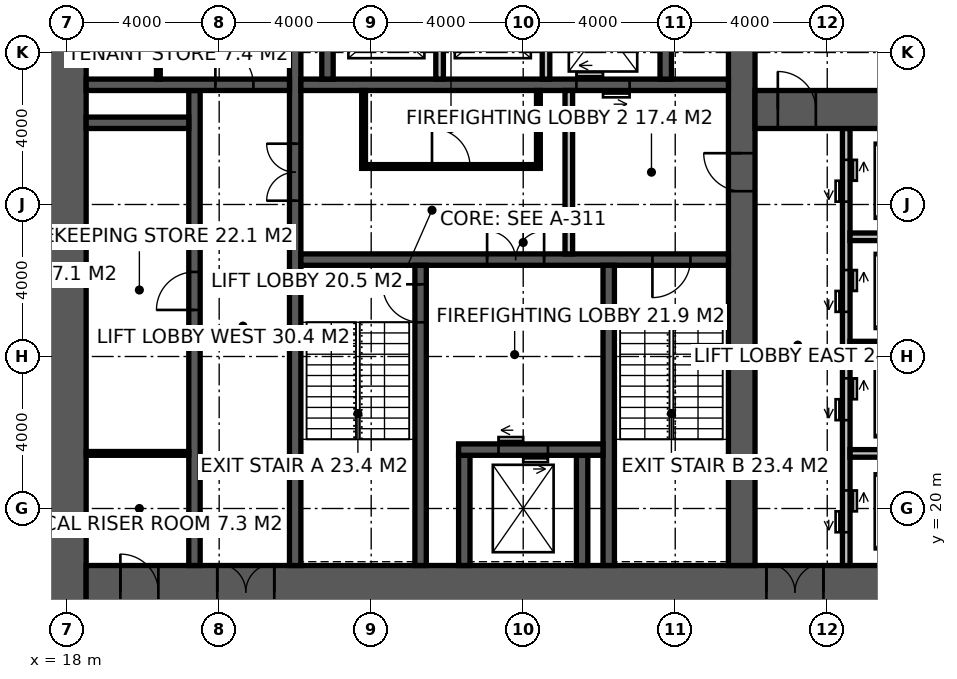
"""IFC4 building model, lengths in metres.
Left out: names, types, materials, properties, quantities, classifications, styles, units other than length and angle.
Written with IfcOpenShell. Run it as: python <this file> out.ifc"""

import sys

from ifc_helpers import new_model, si_unit, direction, frame, frame_2d, origin, place, context, subcontext, project, spatial, rectangle, extrude, element, fill, save


model = new_model("IFC4")
c1 = context("Model", 3, precision=1e-05, world=origin(), true_north=direction((0.0, 1.0)))
c2 = subcontext(c1, "Body", "Model", "MODEL_VIEW")
j1 = project(units=[si_unit("LENGTHUNIT", "METRE"), si_unit("PLANEANGLEUNIT", "RADIAN")], contexts=[c1])
p1 = place(None, origin())
s1 = spatial("IfcSite", under=j1, at=p1, CompositionType="ELEMENT")
p2 = place(p1, origin())
s2 = spatial("IfcBuilding", under=s1, at=p2, CompositionType="ELEMENT")
p3 = place(p2, frame((0.0, 0.0, 19.0)))
s3 = spatial("IfcBuildingStorey", under=s2, at=p3, CompositionType="ELEMENT", Elevation=19.0)
p4 = place(p3, frame((18.0, 17.1, -0.15), z_axis=(0.0, 0.0, 1.0), x_axis=(0.0, 1.0, 0.0)))
e1 = element("IfcWall", 1, at=p4, inside=s3, PredefinedType="SHEAR", context=c2, shape_type="SweptSolid", body=[
    extrude(rectangle(XDim=19.8, YDim=1.0, at=frame_2d((9.9, 0.0))), origin(), (0.0, 0.0, 1.0), 4.0),
])
p5 = place(p3, frame((18.5, 17.8, -0.15), z_axis=(0.0, 0.0, 1.0), x_axis=(1.0, 0.0, 0.0)))
e2 = element("IfcWall", 2, at=p5, inside=s3, PredefinedType="SHEAR", context=c2, shape_type="SweptSolid", body=[
    extrude(rectangle(XDim=23.0, YDim=1.4, at=frame_2d((11.5, 0.0))), origin(), (0.0, 0.0, 1.0), 4.0),
])
p6 = place(p5, frame((3.45, 0.0, 0.15)))
e3 = element("IfcOpeningElement", 3, at=p6, cuts=e2, PredefinedType="OPENING", context=c2, shape_type="SweptSolid", body=[
    extrude(rectangle(XDim=1.5, YDim=2.4, at=frame_2d((0.75, 1.2))), frame((0.0, 0.71, 0.0), z_axis=(0.0, -1.0, 0.0), x_axis=(1.0, 0.0, 0.0)), (0.0, 0.0, 1.0), 1.42),
])
p7 = place(p5, frame((17.9, 0.0, 0.15)))
e4 = element("IfcOpeningElement", 4, at=p7, cuts=e2, PredefinedType="OPENING", context=c2, shape_type="SweptSolid", body=[
    extrude(rectangle(XDim=1.5, YDim=2.4, at=frame_2d((0.75, 1.2))), frame((0.0, 0.71, 0.0), z_axis=(0.0, -1.0, 0.0), x_axis=(1.0, 0.0, 0.0)), (0.0, 0.0, 1.0), 1.42),
])
p8 = place(p5, frame((0.9, 0.0, 0.15)))
e5 = element("IfcOpeningElement", 5, at=p8, cuts=e2, PredefinedType="OPENING", context=c2, shape_type="SweptSolid", body=[
    extrude(rectangle(XDim=1.0, YDim=2.2, at=frame_2d((0.5, 1.1))), frame((0.0, 0.71, 0.0), z_axis=(0.0, -1.0, 0.0), x_axis=(1.0, 0.0, 0.0)), (0.0, 0.0, 1.0), 1.42),
])
p9 = place(p3, frame((35.75, 18.5, -0.15), z_axis=(0.0, 0.0, 1.0), x_axis=(0.0, 1.0, 0.0)))
e6 = element("IfcWall", 6, at=p9, inside=s3, PredefinedType="SHEAR", context=c2, shape_type="SweptSolid", body=[
    extrude(rectangle(XDim=17.0, YDim=0.7, at=frame_2d((8.5, 0.0))), origin(), (0.0, 0.0, 1.0), 4.0),
])
p10 = place(p9, frame((9.85, 0.0, 0.15)))
e7 = element("IfcOpeningElement", 7, at=p10, cuts=e6, PredefinedType="OPENING", context=c2, shape_type="SweptSolid", body=[
    extrude(rectangle(XDim=1.0, YDim=2.2, at=frame_2d((0.5, 1.1))), frame((0.0, 0.36, 0.0), z_axis=(0.0, -1.0, 0.0), x_axis=(1.0, 0.0, 0.0)), (0.0, 0.0, 1.0), 0.72),
])
p11 = place(p3, frame((24.0, 18.5, -0.15), z_axis=(0.0, 0.0, 1.0), x_axis=(0.0, 1.0, 0.0)))
e8 = element("IfcWall", 8, at=p11, inside=s3, PredefinedType="SHEAR", context=c2, shape_type="SweptSolid", body=[
    extrude(rectangle(XDim=17.0, YDim=0.3, at=frame_2d((8.5, 0.0))), origin(), (0.0, 0.0, 1.0), 4.0),
])
p12 = place(p11, frame((9.6, 0.0, 0.15)))
e9 = element("IfcOpeningElement", 9, at=p12, cuts=e8, PredefinedType="OPENING", context=c2, shape_type="SweptSolid", body=[
    extrude(rectangle(XDim=1.5, YDim=2.4, at=frame_2d((0.75, 1.2))), frame((0.0, 0.16, 0.0), z_axis=(0.0, -1.0, 0.0), x_axis=(1.0, 0.0, 0.0)), (0.0, 0.0, 1.0), 0.32),
])
p13 = place(p3, frame((24.15, 26.55, -0.15), z_axis=(0.0, 0.0, 1.0), x_axis=(1.0, 0.0, 0.0)))
e10 = element("IfcWall", 10, at=p13, inside=s3, PredefinedType="SHEAR", context=c2, shape_type="SweptSolid", body=[
    extrude(rectangle(XDim=11.25, YDim=0.3, at=frame_2d((5.625, 0.0))), origin(), (0.0, 0.0, 1.0), 4.0),
])
p14 = place(p13, frame((9.25, 0.0, 0.15)))
e11 = element("IfcOpeningElement", 11, at=p14, cuts=e10, PredefinedType="OPENING", context=c2, shape_type="SweptSolid", body=[
    extrude(rectangle(XDim=1.0, YDim=2.2, at=frame_2d((0.5, 1.1))), frame((0.0, 0.16, 0.0), z_axis=(0.0, -1.0, 0.0), x_axis=(1.0, 0.0, 0.0)), (0.0, 0.0, 1.0), 0.32),
])
p15 = place(p13, frame((4.9, 0.0, 0.15)))
e12 = element("IfcOpeningElement", 12, at=p15, cuts=e10, PredefinedType="OPENING", context=c2, shape_type="SweptSolid", body=[
    extrude(rectangle(XDim=1.5, YDim=2.4, at=frame_2d((0.75, 1.2))), frame((0.0, 0.16, 0.0), z_axis=(0.0, -1.0, 0.0), x_axis=(1.0, 0.0, 0.0)), (0.0, 0.0, 1.0), 0.32),
])
p16 = place(p3, frame((27.3, 18.5, -0.15), z_axis=(0.0, 0.0, 1.0), x_axis=(0.0, 1.0, 0.0)))
e13 = element("IfcWall", 13, at=p16, inside=s3, PredefinedType="SHEAR", context=c2, shape_type="SweptSolid", body=[
    extrude(rectangle(XDim=7.9, YDim=0.3, at=frame_2d((3.95, 0.0))), origin(), (0.0, 0.0, 1.0), 4.0),
])
p17 = place(p16, frame((6.4, 0.0, 0.15)))
e14 = element("IfcOpeningElement", 14, at=p17, cuts=e13, PredefinedType="OPENING", context=c2, shape_type="SweptSolid", body=[
    extrude(rectangle(XDim=1.0, YDim=2.2, at=frame_2d((0.5, 1.1))), frame((0.0, 0.16, 0.0), z_axis=(0.0, -1.0, 0.0), x_axis=(1.0, 0.0, 0.0)), (0.0, 0.0, 1.0), 0.32),
])
p18 = place(p3, frame((32.25, 18.5, -0.15), z_axis=(0.0, 0.0, 1.0), x_axis=(0.0, 1.0, 0.0)))
e15 = element("IfcWall", 15, at=p18, inside=s3, PredefinedType="SHEAR", context=c2, shape_type="SweptSolid", body=[
    extrude(rectangle(XDim=7.9, YDim=0.3, at=frame_2d((3.95, 0.0))), origin(), (0.0, 0.0, 1.0), 4.0),
])
for number, where, z_axis, x_axis in (
    (16, (28.45, 18.5, -0.15), (0.0, 0.0, 1.0), (0.0, 1.0, 0.0)),
    (17, (31.55, 18.5, -0.15), (0.0, 0.0, 1.0), (0.0, 1.0, 0.0)),
):
    element("IfcWall", number, at=place(p3, frame(where, z_axis=z_axis, x_axis=x_axis)), inside=s3, PredefinedType="SHEAR", context=c2, shape_type="SweptSolid", body=[
        extrude(rectangle(XDim=2.9, YDim=0.3, at=frame_2d((1.45, 0.0))), origin(), (0.0, 0.0, 1.0), 4.0),
    ])
p19 = place(p3, frame((28.3, 21.55, -0.15), z_axis=(0.0, 0.0, 1.0), x_axis=(1.0, 0.0, 0.0)))
e18 = element("IfcWall", 18, at=p19, inside=s3, PredefinedType="SHEAR", context=c2, shape_type="SweptSolid", body=[
    extrude(rectangle(XDim=3.8, YDim=0.3, at=frame_2d((1.9, 0.0))), origin(), (0.0, 0.0, 1.0), 4.0),
])
p20 = place(p19, frame((1.05, 0.0, 0.15)))
e19 = element("IfcOpeningElement", 19, at=p20, cuts=e18, PredefinedType="OPENING", context=c2, shape_type="SweptSolid", body=[
    extrude(rectangle(XDim=1.3, YDim=2.4, at=frame_2d((0.65, 1.2))), frame((0.0, 0.16, 0.0), z_axis=(0.0, -1.0, 0.0), x_axis=(1.0, 0.0, 0.0)), (0.0, 0.0, 1.0), 0.32),
])
p21 = place(p3, frame((24.15, 31.15, -0.15), z_axis=(0.0, 0.0, 1.0), x_axis=(1.0, 0.0, 0.0)))
e20 = element("IfcWall", 20, at=p21, inside=s3, PredefinedType="SHEAR", context=c2, shape_type="SweptSolid", body=[
    extrude(rectangle(XDim=11.25, YDim=0.3, at=frame_2d((5.625, 0.0))), origin(), (0.0, 0.0, 1.0), 4.0),
])
p22 = place(p21, frame((7.25, 0.0, 0.15)))
e21 = element("IfcOpeningElement", 21, at=p22, cuts=e20, PredefinedType="OPENING", context=c2, shape_type="SweptSolid", body=[
    extrude(rectangle(XDim=1.4, YDim=2.4, at=frame_2d((0.7, 1.2))), frame((0.0, 0.16, 0.0), z_axis=(0.0, -1.0, 0.0), x_axis=(1.0, 0.0, 0.0)), (0.0, 0.0, 1.0), 0.32),
])
p23 = place(p3, frame((21.35, 18.5, -0.15), z_axis=(0.0, 0.0, 1.0), x_axis=(0.0, 1.0, 0.0)))
e22 = element("IfcWall", 22, at=p23, inside=s3, PredefinedType="SHEAR", context=c2, shape_type="SweptSolid", body=[
    extrude(rectangle(XDim=12.5, YDim=0.3, at=frame_2d((6.25, 0.0))), origin(), (0.0, 0.0, 1.0), 4.0),
])
p24 = place(p23, frame((6.725, 0.0, 0.15)))
e23 = element("IfcOpeningElement", 23, at=p24, cuts=e22, PredefinedType="OPENING", context=c2, shape_type="SweptSolid", body=[
    extrude(rectangle(XDim=1.0, YDim=2.2, at=frame_2d((0.5, 1.1))), frame((0.0, 0.16, 0.0), z_axis=(0.0, -1.0, 0.0), x_axis=(1.0, 0.0, 0.0)), (0.0, 0.0, 1.0), 0.32),
])
p25 = place(p3, frame((18.5, 31.15, -0.15), z_axis=(0.0, 0.0, 1.0), x_axis=(1.0, 0.0, 0.0)))
e24 = element("IfcWall", 24, at=p25, inside=s3, PredefinedType="SHEAR", context=c2, shape_type="SweptSolid", body=[
    extrude(rectangle(XDim=5.35, YDim=0.3, at=frame_2d((2.675, 0.0))), origin(), (0.0, 0.0, 1.0), 4.0),
])
p26 = place(p25, frame((3.4, 0.0, 0.15)))
e25 = element("IfcOpeningElement", 25, at=p26, cuts=e24, PredefinedType="OPENING", context=c2, shape_type="SweptSolid", body=[
    extrude(rectangle(XDim=1.0, YDim=2.2, at=frame_2d((0.5, 1.1))), frame((0.0, 0.16, 0.0), z_axis=(0.0, -1.0, 0.0), x_axis=(1.0, 0.0, 0.0)), (0.0, 0.0, 1.0), 0.32),
])
p27 = place(p3, frame((18.5, 30.15, -0.15), z_axis=(0.0, 0.0, 1.0), x_axis=(1.0, 0.0, 0.0)))
e26 = element("IfcWall", 26, at=p27, inside=s3, PredefinedType="SHEAR", context=c2, shape_type="SweptSolid", body=[
    extrude(rectangle(XDim=2.7, YDim=0.3, at=frame_2d((1.35, 0.0))), origin(), (0.0, 0.0, 1.0), 4.0),
])
for number, where, z_axis, x_axis in (
    (27, (24.85, 31.3, -0.15), (0.0, 0.0, 1.0), (0.0, 1.0, 0.0)),
    (28, (33.75, 31.3, -0.15), (0.0, 0.0, 1.0), (0.0, 1.0, 0.0)),
):
    element("IfcWall", number, at=place(p3, frame(where, z_axis=z_axis, x_axis=x_axis)), inside=s3, PredefinedType="SHEAR", context=c2, shape_type="SweptSolid", body=[
        extrude(rectangle(XDim=4.2, YDim=0.3, at=frame_2d((2.1, 0.0))), origin(), (0.0, 0.0, 1.0), 4.0),
    ])
for number, where, z_axis, x_axis in (
    (29, (27.8, 31.3, -0.15), (0.0, 0.0, 1.0), (0.0, 1.0, 0.0)),
    (30, (30.6, 31.3, -0.15), (0.0, 0.0, 1.0), (0.0, 1.0, 0.0)),
):
    element("IfcWall", number, at=place(p3, frame(where, z_axis=z_axis, x_axis=x_axis)), inside=s3, PredefinedType="SOLIDWALL", context=c2, shape_type="SweptSolid", body=[
        extrude(rectangle(XDim=2.8, YDim=0.2, at=frame_2d((1.4, 0.0))), origin(), (0.0, 0.0, 1.0), 4.0),
    ])
p28 = place(p3, frame((38.5, 18.5, -0.15), z_axis=(0.0, 0.0, 1.0), x_axis=(0.0, 1.0, 0.0)))
e31 = element("IfcWall", 31, at=p28, inside=s3, PredefinedType="SOLIDWALL", context=c2, shape_type="SweptSolid", body=[
    extrude(rectangle(XDim=11.5, YDim=0.2, at=frame_2d((5.75, 0.0))), origin(), (0.0, 0.0, 1.0), 4.0),
])
p29 = place(p28, frame((0.875, 0.0, 0.15)))
e32 = element("IfcOpeningElement", 32, at=p29, cuts=e31, PredefinedType="OPENING", context=c2, shape_type="SweptSolid", body=[
    extrude(rectangle(XDim=1.1, YDim=2.2, at=frame_2d((0.55, 1.1))), frame((0.0, 0.11, 0.0), z_axis=(0.0, -1.0, 0.0), x_axis=(1.0, 0.0, 0.0)), (0.0, 0.0, 1.0), 0.22),
])
p30 = place(p28, frame((3.825, 0.0, 0.15)))
e33 = element("IfcOpeningElement", 33, at=p30, cuts=e31, PredefinedType="OPENING", context=c2, shape_type="SweptSolid", body=[
    extrude(rectangle(XDim=1.1, YDim=2.2, at=frame_2d((0.55, 1.1))), frame((0.0, 0.11, 0.0), z_axis=(0.0, -1.0, 0.0), x_axis=(1.0, 0.0, 0.0)), (0.0, 0.0, 1.0), 0.22),
])
p31 = place(p28, frame((6.675, 0.0, 0.15)))
e34 = element("IfcOpeningElement", 34, at=p31, cuts=e31, PredefinedType="OPENING", context=c2, shape_type="SweptSolid", body=[
    extrude(rectangle(XDim=1.1, YDim=2.2, at=frame_2d((0.55, 1.1))), frame((0.0, 0.11, 0.0), z_axis=(0.0, -1.0, 0.0), x_axis=(1.0, 0.0, 0.0)), (0.0, 0.0, 1.0), 0.22),
])
p32 = place(p28, frame((9.575, 0.0, 0.15)))
e35 = element("IfcOpeningElement", 35, at=p32, cuts=e31, PredefinedType="OPENING", context=c2, shape_type="SweptSolid", body=[
    extrude(rectangle(XDim=1.1, YDim=2.2, at=frame_2d((0.55, 1.1))), frame((0.0, 0.11, 0.0), z_axis=(0.0, -1.0, 0.0), x_axis=(1.0, 0.0, 0.0)), (0.0, 0.0, 1.0), 0.22),
])
p33 = place(p3, frame((36.1, 30.5, -0.15), z_axis=(0.0, 0.0, 1.0), x_axis=(1.0, 0.0, 0.0)))
e36 = element("IfcWall", 36, at=p33, inside=s3, PredefinedType="SHEAR", context=c2, shape_type="SweptSolid", body=[
    extrude(rectangle(XDim=5.4, YDim=1.0, at=frame_2d((2.7, 0.0))), origin(), (0.0, 0.0, 1.0), 4.0),
])
p34 = place(p33, frame((0.6, 0.0, 0.15)))
e37 = element("IfcOpeningElement", 37, at=p34, cuts=e36, PredefinedType="OPENING", context=c2, shape_type="SweptSolid", body=[
    extrude(rectangle(XDim=1.0, YDim=2.2, at=frame_2d((0.5, 1.1))), frame((0.0, 0.51, 0.0), z_axis=(0.0, -1.0, 0.0), x_axis=(1.0, 0.0, 0.0)), (0.0, 0.0, 1.0), 1.02),
])
for number, where, z_axis, x_axis in (
    (38, (38.6, 21.45, -0.15), (0.0, 0.0, 1.0), (1.0, 0.0, 0.0)),
    (39, (38.6, 24.3, -0.15), (0.0, 0.0, 1.0), (1.0, 0.0, 0.0)),
    (40, (38.6, 27.15, -0.15), (0.0, 0.0, 1.0), (1.0, 0.0, 0.0)),
):
    element("IfcWall", number, at=place(p3, frame(where, z_axis=z_axis, x_axis=x_axis)), inside=s3, PredefinedType="SOLIDWALL", context=c2, shape_type="SweptSolid", body=[
        extrude(rectangle(XDim=2.9, YDim=0.2, at=frame_2d((1.45, 0.0))), origin(), (0.0, 0.0, 1.0), 4.0),
    ])
p35 = place(p3, frame((31.2, 26.7, 0.0), z_axis=(0.0, 0.0, 1.0), x_axis=(0.0, 1.0, 0.0)))
e41 = element("IfcWall", 41, at=p35, inside=s3, PredefinedType="SOLIDWALL", context=c2, shape_type="SweptSolid", body=[
    extrude(rectangle(XDim=4.3, YDim=0.2, at=frame_2d((2.15, 0.0))), origin(), (0.0, 0.0, 1.0), 3.85),
])
p36 = place(p3, frame((20.4, 31.3, 0.0), z_axis=(0.0, 0.0, 1.0), x_axis=(0.0, 1.0, 0.0)))
e42 = element("IfcWall", 42, at=p36, inside=s3, PredefinedType="PARTITIONING", context=c2, shape_type="SweptSolid", body=[
    extrude(rectangle(XDim=4.2, YDim=0.1, at=frame_2d((2.1, 0.0))), origin(), (0.0, 0.0, 1.0), 3.85),
])
p37 = place(p36, frame((1.55, 0.0, 0.0)))
e43 = element("IfcOpeningElement", 43, at=p37, cuts=e42, PredefinedType="OPENING", context=c2, shape_type="SweptSolid", body=[
    extrude(rectangle(XDim=1.0, YDim=2.2, at=frame_2d((0.5, 1.1))), frame((0.0, 0.06, 0.0), z_axis=(0.0, -1.0, 0.0), x_axis=(1.0, 0.0, 0.0)), (0.0, 0.0, 1.0), 0.12),
])
p38 = place(p3, frame((25.75, 29.0, 0.0), z_axis=(0.0, 0.0, 1.0), x_axis=(1.0, 0.0, 0.0)))
e44 = element("IfcWall", 44, at=p38, inside=s3, PredefinedType="PARTITIONING", context=c2, shape_type="SweptSolid", body=[
    extrude(rectangle(XDim=4.7, YDim=0.1, at=frame_2d((2.35, 0.0))), origin(), (0.0, 0.0, 1.0), 3.85),
])
p39 = place(p38, frame((1.85, 0.0, 0.0)))
e45 = element("IfcOpeningElement", 45, at=p39, cuts=e44, PredefinedType="OPENING", context=c2, shape_type="SweptSolid", body=[
    extrude(rectangle(XDim=1.0, YDim=2.2, at=frame_2d((0.5, 1.1))), frame((0.0, 0.06, 0.0), z_axis=(0.0, -1.0, 0.0), x_axis=(1.0, 0.0, 0.0)), (0.0, 0.0, 1.0), 0.12),
])
for number, where, z_axis, x_axis in (
    (46, (25.8, 29.05, 0.0), (0.0, 0.0, 1.0), (0.0, 1.0, 0.0)),
    (47, (30.4, 29.05, 0.0), (0.0, 0.0, 1.0), (0.0, 1.0, 0.0)),
):
    element("IfcWall", number, at=place(p3, frame(where, z_axis=z_axis, x_axis=x_axis)), inside=s3, PredefinedType="PARTITIONING", context=c2, shape_type="SweptSolid", body=[
        extrude(rectangle(XDim=1.95, YDim=0.1, at=frame_2d((0.975, 0.0))), origin(), (0.0, 0.0, 1.0), 3.85),
    ])
p40 = place(p3, frame((18.5, 21.45, 0.0), z_axis=(0.0, 0.0, 1.0), x_axis=(1.0, 0.0, 0.0)))
e48 = element("IfcWall", 48, at=p40, inside=s3, PredefinedType="PARTITIONING", context=c2, shape_type="SweptSolid", body=[
    extrude(rectangle(XDim=2.7, YDim=0.1, at=frame_2d((1.35, 0.0))), origin(), (0.0, 0.0, 1.0), 3.85),
])
p41 = place(p17, origin())
e49 = element("IfcDoor", 49, at=p41, inside=s3, OperationType="SINGLE_SWING_RIGHT", PredefinedType="DOOR", context=c2, shape_type="SweptSolid", body=[
    extrude(rectangle(XDim=1.0, YDim=2.2, at=frame_2d((0.5, 1.1))), frame((0.0, 0.025, 0.0), z_axis=(0.0, -1.0, 0.0), x_axis=(1.0, 0.0, 0.0)), (0.0, 0.0, 1.0), 0.05),
])
fill(e14, e49)
p42 = place(p14, frame((1.0, 0.0, 0.0), z_axis=(0.0, 0.0, 1.0), x_axis=(-1.0, 0.0, 0.0)))
e50 = element("IfcDoor", 50, at=p42, inside=s3, OperationType="SINGLE_SWING_RIGHT", PredefinedType="DOOR", context=c2, shape_type="SweptSolid", body=[
    extrude(rectangle(XDim=1.0, YDim=2.2, at=frame_2d((0.5, 1.1))), frame((0.0, 0.025, 0.0), z_axis=(0.0, -1.0, 0.0), x_axis=(1.0, 0.0, 0.0)), (0.0, 0.0, 1.0), 0.05),
])
fill(e11, e50)
p43 = place(p10, origin())
e51 = element("IfcDoor", 51, at=p43, inside=s3, OperationType="SINGLE_SWING_RIGHT", PredefinedType="DOOR", context=c2, shape_type="SweptSolid", body=[
    extrude(rectangle(XDim=1.0, YDim=2.2, at=frame_2d((0.5, 1.1))), frame((0.0, 0.025, 0.0), z_axis=(0.0, -1.0, 0.0), x_axis=(1.0, 0.0, 0.0)), (0.0, 0.0, 1.0), 0.05),
])
fill(e7, e51)
p44 = place(p15, origin())
e52 = element("IfcDoor", 52, at=p44, inside=s3, OperationType="DOUBLE_DOOR_DOUBLE_SWING", PredefinedType="DOOR", context=c2, shape_type="SweptSolid", body=[
    extrude(rectangle(XDim=1.5, YDim=2.4, at=frame_2d((0.75, 1.2))), frame((0.0, 0.025, 0.0), z_axis=(0.0, -1.0, 0.0), x_axis=(1.0, 0.0, 0.0)), (0.0, 0.0, 1.0), 0.05),
])
fill(e12, e52)
p45 = place(p12, origin())
e53 = element("IfcDoor", 53, at=p45, inside=s3, OperationType="DOUBLE_DOOR_DOUBLE_SWING", PredefinedType="DOOR", context=c2, shape_type="SweptSolid", body=[
    extrude(rectangle(XDim=1.5, YDim=2.4, at=frame_2d((0.75, 1.2))), frame((0.0, 0.025, 0.0), z_axis=(0.0, -1.0, 0.0), x_axis=(1.0, 0.0, 0.0)), (0.0, 0.0, 1.0), 0.05),
])
fill(e9, e53)
p46 = place(p26, origin())
e54 = element("IfcDoor", 54, at=p46, inside=s3, OperationType="SINGLE_SWING_LEFT", PredefinedType="DOOR", context=c2, shape_type="SweptSolid", body=[
    extrude(rectangle(XDim=1.0, YDim=2.2, at=frame_2d((0.5, 1.1))), frame((0.0, 0.025, 0.0), z_axis=(0.0, -1.0, 0.0), x_axis=(1.0, 0.0, 0.0)), (0.0, 0.0, 1.0), 0.05),
])
fill(e25, e54)
p47 = place(p39, origin())
e55 = element("IfcDoor", 55, at=p47, inside=s3, OperationType="SINGLE_SWING_LEFT", PredefinedType="DOOR", context=c2, shape_type="SweptSolid", body=[
    extrude(rectangle(XDim=1.0, YDim=2.2, at=frame_2d((0.5, 1.1))), frame((0.0, 0.025, 0.0), z_axis=(0.0, -1.0, 0.0), x_axis=(1.0, 0.0, 0.0)), (0.0, 0.0, 1.0), 0.05),
])
fill(e45, e55)
p48 = place(p24, origin())
e56 = element("IfcDoor", 56, at=p48, inside=s3, OperationType="SINGLE_SWING_LEFT", PredefinedType="DOOR", context=c2, shape_type="SweptSolid", body=[
    extrude(rectangle(XDim=1.0, YDim=2.2, at=frame_2d((0.5, 1.1))), frame((0.0, 0.025, 0.0), z_axis=(0.0, -1.0, 0.0), x_axis=(1.0, 0.0, 0.0)), (0.0, 0.0, 1.0), 0.05),
])
fill(e23, e56)
p49 = place(p6, origin())
e57 = element("IfcDoor", 57, at=p49, inside=s3, OperationType="DOUBLE_DOOR_DOUBLE_SWING", PredefinedType="DOOR", context=c2, shape_type="SweptSolid", body=[
    extrude(rectangle(XDim=1.5, YDim=2.4, at=frame_2d((0.75, 1.2))), frame((0.0, 0.025, 0.0), z_axis=(0.0, -1.0, 0.0), x_axis=(1.0, 0.0, 0.0)), (0.0, 0.0, 1.0), 0.05),
])
fill(e3, e57)
p50 = place(p7, origin())
e58 = element("IfcDoor", 58, at=p50, inside=s3, OperationType="DOUBLE_DOOR_DOUBLE_SWING", PredefinedType="DOOR", context=c2, shape_type="SweptSolid", body=[
    extrude(rectangle(XDim=1.5, YDim=2.4, at=frame_2d((0.75, 1.2))), frame((0.0, 0.025, 0.0), z_axis=(0.0, -1.0, 0.0), x_axis=(1.0, 0.0, 0.0)), (0.0, 0.0, 1.0), 0.05),
])
fill(e4, e58)
p51 = place(p34, origin())
e59 = element("IfcDoor", 59, at=p51, inside=s3, OperationType="SINGLE_SWING_LEFT", PredefinedType="DOOR", context=c2, shape_type="SweptSolid", body=[
    extrude(rectangle(XDim=1.0, YDim=2.2, at=frame_2d((0.5, 1.1))), frame((0.0, 0.025, 0.0), z_axis=(0.0, -1.0, 0.0), x_axis=(1.0, 0.0, 0.0)), (0.0, 0.0, 1.0), 0.05),
])
fill(e37, e59)
p52 = place(p8, origin())
e60 = element("IfcDoor", 60, at=p52, inside=s3, OperationType="SINGLE_SWING_LEFT", PredefinedType="DOOR", context=c2, shape_type="SweptSolid", body=[
    extrude(rectangle(XDim=1.0, YDim=2.2, at=frame_2d((0.5, 1.1))), frame((0.0, 0.025, 0.0), z_axis=(0.0, -1.0, 0.0), x_axis=(1.0, 0.0, 0.0)), (0.0, 0.0, 1.0), 0.05),
])
fill(e5, e60)
p53 = place(p20, origin())
e61 = element("IfcDoor", 61, at=p53, inside=s3, OperationType="DOUBLE_DOOR_SLIDING", PredefinedType="DOOR", context=c2, shape_type="SweptSolid", body=[
    extrude(rectangle(XDim=1.3, YDim=2.4, at=frame_2d((0.65, 1.2))), frame((0.0, 0.025, 0.0), z_axis=(0.0, -1.0, 0.0), x_axis=(1.0, 0.0, 0.0)), (0.0, 0.0, 1.0), 0.05),
])
fill(e19, e61)
p54 = place(p22, origin())
e62 = element("IfcDoor", 62, at=p54, inside=s3, OperationType="DOUBLE_DOOR_SLIDING", PredefinedType="DOOR", context=c2, shape_type="SweptSolid", body=[
    extrude(rectangle(XDim=1.4, YDim=2.4, at=frame_2d((0.7, 1.2))), frame((0.0, 0.025, 0.0), z_axis=(0.0, -1.0, 0.0), x_axis=(1.0, 0.0, 0.0)), (0.0, 0.0, 1.0), 0.05),
])
fill(e21, e62)
p55 = place(p29, origin())
e63 = element("IfcDoor", 63, at=p55, inside=s3, OperationType="DOUBLE_DOOR_SLIDING", PredefinedType="DOOR", context=c2, shape_type="SweptSolid", body=[
    extrude(rectangle(XDim=1.1, YDim=2.2, at=frame_2d((0.55, 1.1))), frame((0.0, 0.025, 0.0), z_axis=(0.0, -1.0, 0.0), x_axis=(1.0, 0.0, 0.0)), (0.0, 0.0, 1.0), 0.05),
])
fill(e32, e63)
p56 = place(p30, origin())
e64 = element("IfcDoor", 64, at=p56, inside=s3, OperationType="DOUBLE_DOOR_SLIDING", PredefinedType="DOOR", context=c2, shape_type="SweptSolid", body=[
    extrude(rectangle(XDim=1.1, YDim=2.2, at=frame_2d((0.55, 1.1))), frame((0.0, 0.025, 0.0), z_axis=(0.0, -1.0, 0.0), x_axis=(1.0, 0.0, 0.0)), (0.0, 0.0, 1.0), 0.05),
])
fill(e33, e64)
p57 = place(p31, origin())
e65 = element("IfcDoor", 65, at=p57, inside=s3, OperationType="DOUBLE_DOOR_SLIDING", PredefinedType="DOOR", context=c2, shape_type="SweptSolid", body=[
    extrude(rectangle(XDim=1.1, YDim=2.2, at=frame_2d((0.55, 1.1))), frame((0.0, 0.025, 0.0), z_axis=(0.0, -1.0, 0.0), x_axis=(1.0, 0.0, 0.0)), (0.0, 0.0, 1.0), 0.05),
])
fill(e34, e65)
p58 = place(p32, origin())
e66 = element("IfcDoor", 66, at=p58, inside=s3, OperationType="DOUBLE_DOOR_SLIDING", PredefinedType="DOOR", context=c2, shape_type="SweptSolid", body=[
    extrude(rectangle(XDim=1.1, YDim=2.2, at=frame_2d((0.55, 1.1))), frame((0.0, 0.025, 0.0), z_axis=(0.0, -1.0, 0.0), x_axis=(1.0, 0.0, 0.0)), (0.0, 0.0, 1.0), 0.05),
])
fill(e35, e66)
save(model, sys.argv[1])
